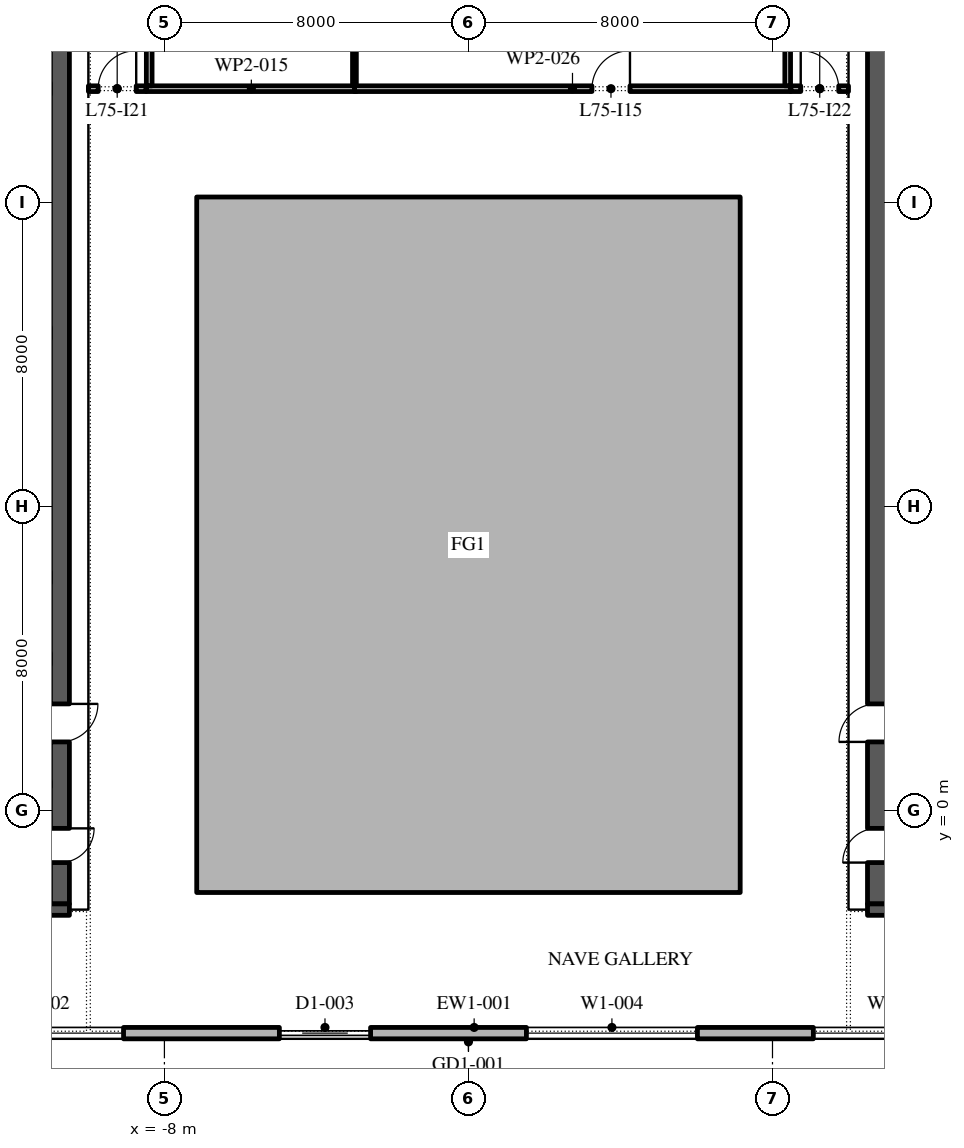
"""IFC4 building model, lengths in metres.
Left out: names, types, materials, properties, quantities, classifications, styles, units other than length and angle.
Written with IfcOpenShell. Run it as: python <this file> out.ifc"""

import sys

from ifc_helpers import new_model, si_unit, direction, frame, frame_2d, origin, place, context, subcontext, project, spatial, polyline, rectangle, outline, extrude, element, fill, save


model = new_model("IFC4")
c1 = context("Model", 3, precision=1e-05, world=origin(), true_north=direction((0.0, 1.0)))
c2 = subcontext(c1, "Body", "Model", "MODEL_VIEW")
j1 = project(units=[si_unit("LENGTHUNIT", "METRE"), si_unit("PLANEANGLEUNIT", "RADIAN")], contexts=[c1])
p1 = place(None, origin())
s1 = spatial("IfcSite", under=j1, at=p1, CompositionType="ELEMENT")
p2 = place(p1, origin())
s2 = spatial("IfcBuilding", under=s1, at=p2, CompositionType="ELEMENT")
p3 = place(p2, frame((0.0, 0.0, 342.6)))
s3 = spatial("IfcBuildingStorey", under=s2, at=p3, CompositionType="ELEMENT", Elevation=342.6)
p4 = place(p3, origin())
e1 = element("IfcWall", 1, at=p4, inside=s3, PredefinedType="STANDARD", context=c2, shape_type="SweptSolid", body=[
    extrude(outline(polyline([(-7.15, -2.15), (7.15, -2.15), (7.15, 16.15), (-7.15, 16.15), (-7.15, -2.15)]), holes=[polyline([(-7.0, -2.0), (-7.0, 16.0), (7.0, 16.0), (7.0, -2.0), (-7.0, -2.0)])]), origin(), (0.0, 0.0, 1.0), 4.0),
])
p5 = place(p3, frame((-22.35, -5.85, 0.0), z_axis=(0.0, 0.0, 1.0), x_axis=(1.0, 0.0, 0.0)))
e2 = element("IfcWall", 2, at=p5, inside=s3, PredefinedType="STANDARD", context=c2, shape_type="SweptSolid", body=[
    extrude(rectangle(XDim=45.0, YDim=0.3, at=frame_2d((22.5, 0.0))), origin(), (0.0, 0.0, 1.0), 4.0),
])
p6 = place(p5, frame((1.375, 0.0, 0.45)))
e3 = element("IfcOpeningElement", 3, at=p6, cuts=e2, PredefinedType="OPENING", context=c2, shape_type="SweptSolid", body=[
    extrude(rectangle(XDim=4.5, YDim=3.05, at=frame_2d((2.25, 1.525))), frame((0.0, 0.16, 0.0), z_axis=(0.0, -1.0, 0.0), x_axis=(1.0, 0.0, 0.0)), (0.0, 0.0, 1.0), 0.32),
])
p7 = place(p5, frame((8.775, 0.0, 0.45)))
e4 = element("IfcOpeningElement", 4, at=p7, cuts=e2, PredefinedType="OPENING", context=c2, shape_type="SweptSolid", body=[
    extrude(rectangle(XDim=4.5, YDim=3.05, at=frame_2d((2.25, 1.525))), frame((0.0, 0.16, 0.0), z_axis=(0.0, -1.0, 0.0), x_axis=(1.0, 0.0, 0.0)), (0.0, 0.0, 1.0), 0.32),
])
p8 = place(p5, frame((17.375, 0.0, 0.0)))
e5 = element("IfcOpeningElement", 5, at=p8, cuts=e2, PredefinedType="OPENING", context=c2, shape_type="SweptSolid", body=[
    extrude(rectangle(XDim=2.4, YDim=3.5, at=frame_2d((1.2, 1.75))), frame((0.0, 0.16, 0.0), z_axis=(0.0, -1.0, 0.0), x_axis=(1.0, 0.0, 0.0)), (0.0, 0.0, 1.0), 0.32),
])
p9 = place(p5, frame((23.875, 0.0, 0.45)))
e6 = element("IfcOpeningElement", 6, at=p9, cuts=e2, PredefinedType="OPENING", context=c2, shape_type="SweptSolid", body=[
    extrude(rectangle(XDim=4.5, YDim=3.05, at=frame_2d((2.25, 1.525))), frame((0.0, 0.16, 0.0), z_axis=(0.0, -1.0, 0.0), x_axis=(1.0, 0.0, 0.0)), (0.0, 0.0, 1.0), 0.32),
])
p10 = place(p5, frame((31.425, 0.0, 0.45)))
e7 = element("IfcOpeningElement", 7, at=p10, cuts=e2, PredefinedType="OPENING", context=c2, shape_type="SweptSolid", body=[
    extrude(rectangle(XDim=4.5, YDim=3.05, at=frame_2d((2.25, 1.525))), frame((0.0, 0.16, 0.0), z_axis=(0.0, -1.0, 0.0), x_axis=(1.0, 0.0, 0.0)), (0.0, 0.0, 1.0), 0.32),
])
p11 = place(p5, frame((38.975, 0.0, 0.45)))
e8 = element("IfcOpeningElement", 8, at=p11, cuts=e2, PredefinedType="OPENING", context=c2, shape_type="SweptSolid", body=[
    extrude(rectangle(XDim=4.5, YDim=3.05, at=frame_2d((2.25, 1.525))), frame((0.0, 0.16, 0.0), z_axis=(0.0, -1.0, 0.0), x_axis=(1.0, 0.0, 0.0)), (0.0, 0.0, 1.0), 0.32),
])
p12 = place(p3, frame((-10.75, -2.45, 0.0), z_axis=(0.0, 0.0, 1.0), x_axis=(0.0, 1.0, 0.0)))
e9 = element("IfcWall", 9, at=p12, inside=s3, PredefinedType="SHEAR", context=c2, shape_type="SweptSolid", body=[
    extrude(rectangle(XDim=27.9, YDim=0.5, at=frame_2d((13.95, 0.0))), origin(), (0.0, 0.0, 1.0), 4.0),
])
p13 = place(p12, frame((23.65, 0.0, 0.0)))
e10 = element("IfcOpeningElement", 10, at=p13, cuts=e9, PredefinedType="OPENING", context=c2, shape_type="SweptSolid", body=[
    extrude(rectangle(XDim=2.4, YDim=2.1, at=frame_2d((1.2, 1.05))), frame((0.0, 0.26, 0.0), z_axis=(0.0, -1.0, 0.0), x_axis=(1.0, 0.0, 0.0)), (0.0, 0.0, 1.0), 0.52),
])
p14 = place(p12, frame((1.087, 0.0, 0.0)))
e11 = element("IfcOpeningElement", 11, at=p14, cuts=e9, PredefinedType="OPENING", context=c2, shape_type="SweptSolid", body=[
    extrude(rectangle(XDim=0.9, YDim=2.1, at=frame_2d((0.45, 1.05))), frame((0.0, 0.26, 0.0), z_axis=(0.0, -1.0, 0.0), x_axis=(1.0, 0.0, 0.0)), (0.0, 0.0, 1.0), 0.52),
])
p15 = place(p12, frame((4.262, 0.0, 0.0)))
e12 = element("IfcOpeningElement", 12, at=p15, cuts=e9, PredefinedType="OPENING", context=c2, shape_type="SweptSolid", body=[
    extrude(rectangle(XDim=1.0, YDim=2.1, at=frame_2d((0.5, 1.05))), frame((0.0, 0.26, 0.0), z_axis=(0.0, -1.0, 0.0), x_axis=(1.0, 0.0, 0.0)), (0.0, 0.0, 1.0), 0.52),
])
p16 = place(p3, frame((-21.5, -2.6, 0.0), z_axis=(0.0, 0.0, 1.0), x_axis=(1.0, 0.0, 0.0)))
e13 = element("IfcWall", 13, at=p16, inside=s3, PredefinedType="SHEAR", context=c2, shape_type="SweptSolid", body=[
    extrude(rectangle(XDim=11.0, YDim=0.3, at=frame_2d((5.5, 0.0))), origin(), (0.0, 0.0, 1.0), 4.0),
])
p17 = place(p3, frame((10.75, -2.45, 0.0), z_axis=(0.0, 0.0, 1.0), x_axis=(0.0, 1.0, 0.0)))
e14 = element("IfcWall", 14, at=p17, inside=s3, PredefinedType="SHEAR", context=c2, shape_type="SweptSolid", body=[
    extrude(rectangle(XDim=27.9, YDim=0.5, at=frame_2d((13.95, 0.0))), origin(), (0.0, 0.0, 1.0), 4.0),
])
p18 = place(p17, frame((23.65, 0.0, 0.0)))
e15 = element("IfcOpeningElement", 15, at=p18, cuts=e14, PredefinedType="OPENING", context=c2, shape_type="SweptSolid", body=[
    extrude(rectangle(XDim=2.4, YDim=2.1, at=frame_2d((1.2, 1.05))), frame((0.0, 0.26, 0.0), z_axis=(0.0, -1.0, 0.0), x_axis=(1.0, 0.0, 0.0)), (0.0, 0.0, 1.0), 0.52),
])
p19 = place(p17, frame((1.087, 0.0, 0.0)))
e16 = element("IfcOpeningElement", 16, at=p19, cuts=e14, PredefinedType="OPENING", context=c2, shape_type="SweptSolid", body=[
    extrude(rectangle(XDim=0.9, YDim=2.1, at=frame_2d((0.45, 1.05))), frame((0.0, 0.26, 0.0), z_axis=(0.0, -1.0, 0.0), x_axis=(1.0, 0.0, 0.0)), (0.0, 0.0, 1.0), 0.52),
])
p20 = place(p17, frame((4.262, 0.0, 0.0)))
e17 = element("IfcOpeningElement", 17, at=p20, cuts=e14, PredefinedType="OPENING", context=c2, shape_type="SweptSolid", body=[
    extrude(rectangle(XDim=1.0, YDim=2.1, at=frame_2d((0.5, 1.05))), frame((0.0, 0.26, 0.0), z_axis=(0.0, -1.0, 0.0), x_axis=(1.0, 0.0, 0.0)), (0.0, 0.0, 1.0), 0.52),
])
p21 = place(p3, frame((10.5, -2.6, 0.0), z_axis=(0.0, 0.0, 1.0), x_axis=(1.0, 0.0, 0.0)))
e18 = element("IfcWall", 18, at=p21, inside=s3, PredefinedType="SHEAR", context=c2, shape_type="SweptSolid", body=[
    extrude(rectangle(XDim=11.0, YDim=0.3, at=frame_2d((5.5, 0.0))), origin(), (0.0, 0.0, 1.0), 4.0),
])
p22 = place(p3, frame((-8.475, 19.0, 0.0), z_axis=(0.0, 0.0, 1.0), x_axis=(1.0, 0.0, 0.0)))
e19 = element("IfcWall", 19, at=p22, inside=s3, PredefinedType="PARTITIONING", context=c2, shape_type="SweptSolid", body=[
    extrude(rectangle(XDim=5.525, YDim=0.15, at=frame_2d((2.763, 0.0))), origin(), (0.0, 0.0, 1.0), 4.0),
])
p23 = place(p3, frame((-8.4, 32.05, 0.0), z_axis=(0.0, 0.0, 1.0), x_axis=(0.0, -1.0, 0.0)))
e20 = element("IfcWall", 20, at=p23, inside=s3, PredefinedType="PARTITIONING", context=c2, shape_type="SweptSolid", body=[
    extrude(rectangle(XDim=12.975, YDim=0.15, at=frame_2d((6.488, 0.0))), origin(), (0.0, 0.0, 1.0), 4.0),
])
p24 = place(p23, frame((3.4, 0.0, 0.0)))
e21 = element("IfcOpeningElement", 21, at=p24, cuts=e20, PredefinedType="OPENING", context=c2, shape_type="SweptSolid", body=[
    extrude(rectangle(XDim=1.0, YDim=2.1, at=frame_2d((0.5, 1.05))), frame((0.0, 0.085, 0.0), z_axis=(0.0, -1.0, 0.0), x_axis=(1.0, 0.0, 0.0)), (0.0, 0.0, 1.0), 0.17),
])
p25 = place(p3, frame((-3.0, 19.075, 0.0), z_axis=(0.0, 0.0, 1.0), x_axis=(0.0, 1.0, 0.0)))
e22 = element("IfcWall", 22, at=p25, inside=s3, PredefinedType="PARTITIONING", context=c2, shape_type="SweptSolid", body=[
    extrude(rectangle(XDim=4.875, YDim=0.1, at=frame_2d((2.438, 0.0))), origin(), (0.0, 0.0, 1.0), 4.0),
])
p26 = place(p3, frame((-3.0, 19.0, 0.0), z_axis=(0.0, 0.0, 1.0), x_axis=(1.0, 0.0, 0.0)))
e23 = element("IfcWall", 23, at=p26, inside=s3, PredefinedType="PARTITIONING", context=c2, shape_type="SweptSolid", body=[
    extrude(rectangle(XDim=11.475, YDim=0.15, at=frame_2d((5.738, 0.0))), origin(), (0.0, 0.0, 1.0), 4.0),
])
p27 = place(p26, frame((6.25, 0.0, 0.0)))
e24 = element("IfcOpeningElement", 24, at=p27, cuts=e23, PredefinedType="OPENING", context=c2, shape_type="SweptSolid", body=[
    extrude(rectangle(XDim=1.0, YDim=2.1, at=frame_2d((0.5, 1.05))), frame((0.0, 0.085, 0.0), z_axis=(0.0, -1.0, 0.0), x_axis=(1.0, 0.0, 0.0)), (0.0, 0.0, 1.0), 0.17),
])
p28 = place(p3, frame((8.4, 19.075, 0.0), z_axis=(0.0, 0.0, 1.0), x_axis=(0.0, 1.0, 0.0)))
e25 = element("IfcWall", 25, at=p28, inside=s3, PredefinedType="PARTITIONING", context=c2, shape_type="SweptSolid", body=[
    extrude(rectangle(XDim=4.875, YDim=0.15, at=frame_2d((2.438, 0.0))), origin(), (0.0, 0.0, 1.0), 4.0),
])
p29 = place(p3, frame((-10.0, 19.0, 0.0), z_axis=(0.0, 0.0, 1.0), x_axis=(1.0, 0.0, 0.0)))
e26 = element("IfcWall", 26, at=p29, inside=s3, PredefinedType="PARTITIONING", context=c2, shape_type="SweptSolid", body=[
    extrude(rectangle(XDim=1.515, YDim=0.15, at=frame_2d((0.757, 0.0))), origin(), (0.0, 0.0, 1.0), 4.0),
])
p30 = place(p29, frame((0.258, 0.0, 0.0)))
e27 = element("IfcOpeningElement", 27, at=p30, cuts=e26, PredefinedType="OPENING", context=c2, shape_type="SweptSolid", body=[
    extrude(rectangle(XDim=1.0, YDim=2.1, at=frame_2d((0.5, 1.05))), frame((0.0, 0.085, 0.0), z_axis=(0.0, -1.0, 0.0), x_axis=(1.0, 0.0, 0.0)), (0.0, 0.0, 1.0), 0.17),
])
p31 = place(p3, frame((8.485, 19.0, 0.0), z_axis=(0.0, 0.0, 1.0), x_axis=(1.0, 0.0, 0.0)))
e28 = element("IfcWall", 28, at=p31, inside=s3, PredefinedType="PARTITIONING", context=c2, shape_type="SweptSolid", body=[
    extrude(rectangle(XDim=1.515, YDim=0.15, at=frame_2d((0.757, 0.0))), origin(), (0.0, 0.0, 1.0), 4.0),
])
p32 = place(p31, frame((0.258, 0.0, 0.0)))
e29 = element("IfcOpeningElement", 29, at=p32, cuts=e28, PredefinedType="OPENING", context=c2, shape_type="SweptSolid", body=[
    extrude(rectangle(XDim=1.0, YDim=2.1, at=frame_2d((0.5, 1.05))), frame((0.0, 0.085, 0.0), z_axis=(0.0, -1.0, 0.0), x_axis=(1.0, 0.0, 0.0)), (0.0, 0.0, 1.0), 0.17),
])
p33 = place(p7, origin())
e30 = element("IfcWindow", 30, at=p33, inside=s3, PartitioningType="DOUBLE_PANEL_VERTICAL", PredefinedType="WINDOW", context=c2, shape_type="SweptSolid", body=[
    extrude(rectangle(XDim=4.5, YDim=3.05, at=frame_2d((2.25, 1.525))), frame((0.0, 0.03, 0.0), z_axis=(0.0, -1.0, 0.0), x_axis=(1.0, 0.0, 0.0)), (0.0, 0.0, 1.0), 0.06),
])
fill(e4, e30)
p34 = place(p8, origin())
e31 = element("IfcDoor", 31, at=p34, inside=s3, OperationType="DOUBLE_DOOR_SLIDING", PredefinedType="DOOR", context=c2, shape_type="SweptSolid", body=[
    extrude(rectangle(XDim=2.4, YDim=3.5, at=frame_2d((1.2, 1.75))), frame((0.0, 0.025, 0.0), z_axis=(0.0, -1.0, 0.0), x_axis=(1.0, 0.0, 0.0)), (0.0, 0.0, 1.0), 0.05),
])
fill(e5, e31)
p35 = place(p9, origin())
e32 = element("IfcWindow", 32, at=p35, inside=s3, PartitioningType="DOUBLE_PANEL_VERTICAL", PredefinedType="WINDOW", context=c2, shape_type="SweptSolid", body=[
    extrude(rectangle(XDim=4.5, YDim=3.05, at=frame_2d((2.25, 1.525))), frame((0.0, 0.03, 0.0), z_axis=(0.0, -1.0, 0.0), x_axis=(1.0, 0.0, 0.0)), (0.0, 0.0, 1.0), 0.06),
])
fill(e6, e32)
p36 = place(p10, origin())
e33 = element("IfcWindow", 33, at=p36, inside=s3, PartitioningType="DOUBLE_PANEL_VERTICAL", PredefinedType="WINDOW", context=c2, shape_type="SweptSolid", body=[
    extrude(rectangle(XDim=4.5, YDim=3.05, at=frame_2d((2.25, 1.525))), frame((0.0, 0.03, 0.0), z_axis=(0.0, -1.0, 0.0), x_axis=(1.0, 0.0, 0.0)), (0.0, 0.0, 1.0), 0.06),
])
fill(e7, e33)
p37 = place(p27, origin())
e34 = element("IfcDoor", 34, at=p37, inside=s3, OperationType="SINGLE_SWING_LEFT", PredefinedType="DOOR", context=c2, shape_type="SweptSolid", body=[
    extrude(rectangle(XDim=1.0, YDim=2.1, at=frame_2d((0.5, 1.05))), frame((0.0, 0.025, 0.0), z_axis=(0.0, -1.0, 0.0), x_axis=(1.0, 0.0, 0.0)), (0.0, 0.0, 1.0), 0.05),
])
fill(e24, e34)
p38 = place(p30, origin())
e35 = element("IfcDoor", 35, at=p38, inside=s3, OperationType="SINGLE_SWING_LEFT", PredefinedType="DOOR", context=c2, shape_type="SweptSolid", body=[
    extrude(rectangle(XDim=1.0, YDim=2.1, at=frame_2d((0.5, 1.05))), frame((0.0, 0.025, 0.0), z_axis=(0.0, -1.0, 0.0), x_axis=(1.0, 0.0, 0.0)), (0.0, 0.0, 1.0), 0.05),
])
fill(e27, e35)
p39 = place(p32, origin())
e36 = element("IfcDoor", 36, at=p39, inside=s3, OperationType="SINGLE_SWING_RIGHT", PredefinedType="DOOR", context=c2, shape_type="SweptSolid", body=[
    extrude(rectangle(XDim=1.0, YDim=2.1, at=frame_2d((0.5, 1.05))), frame((0.0, 0.025, 0.0), z_axis=(0.0, -1.0, 0.0), x_axis=(1.0, 0.0, 0.0)), (0.0, 0.0, 1.0), 0.05),
])
fill(e29, e36)
save(model, sys.argv[1])
